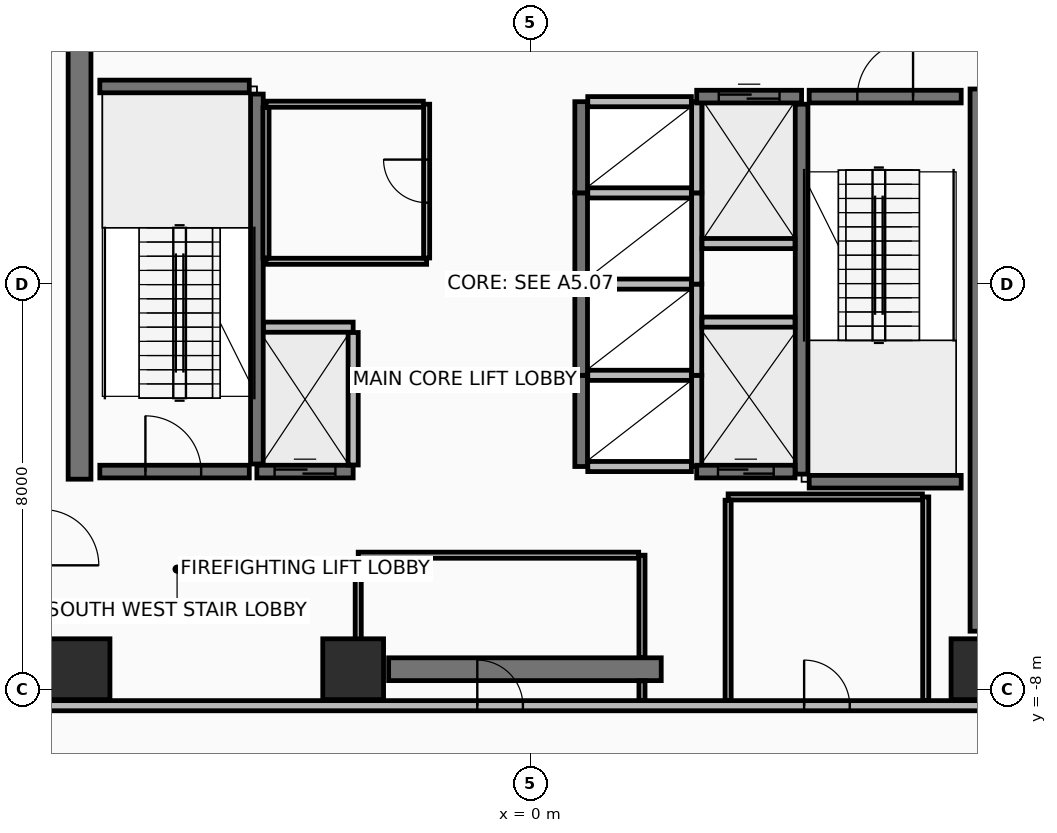
"""IFC4 building model, lengths in metres.
Left out: names, types, materials, properties, quantities, classifications, styles, units other than length and angle.
Written with IfcOpenShell. Run it as: python <this file> out.ifc"""

import sys

from ifc_helpers import new_model, si_unit, direction, frame, frame_2d, origin, origin_2d, place, context, subcontext, project, spatial, rectangle, extrude, element, fill, save


model = new_model("IFC4")
c1 = context("Model", 3, precision=1e-05, world=origin(), true_north=direction((0.0, 1.0)))
c2 = subcontext(c1, "Body", "Model", "MODEL_VIEW")
j1 = project(units=[si_unit("LENGTHUNIT", "METRE"), si_unit("PLANEANGLEUNIT", "RADIAN")], contexts=[c1])
p1 = place(None, origin())
s1 = spatial("IfcSite", under=j1, at=p1, CompositionType="ELEMENT")
p2 = place(p1, origin())
s2 = spatial("IfcBuilding", under=s1, at=p2, CompositionType="ELEMENT")
p3 = place(p2, frame((0.0, 0.0, 107.7)))
s3 = spatial("IfcBuildingStorey", under=s2, at=p3, CompositionType="ELEMENT", Elevation=107.7)
for number, where, z_axis, x_axis in (
    (1, (-8.9, -7.6, 0.0), (0.0, 0.0, 1.0), (1.0, 0.0, 0.0)),
    (2, (-3.5, -7.6, 0.0), (0.0, 0.0, 1.0), (1.0, 0.0, 0.0)),
    (3, (8.9, -7.6, 0.0), (0.0, 0.0, 1.0), (1.0, 0.0, 0.0)),
):
    element("IfcColumn", number, at=place(p3, frame(where, z_axis=z_axis, x_axis=x_axis)), inside=s3, PredefinedType="COLUMN", context=c2, shape_type="SweptSolid", body=[
        extrude(rectangle(XDim=1.2, YDim=1.2, at=origin_2d()), origin(), (0.0, 0.0, 1.0), 4.75),
    ])
p4 = place(p3, frame((-2.8, -7.6, 0.0), z_axis=(0.0, 0.0, 1.0), x_axis=(1.0, 0.0, 0.0)))
e4 = element("IfcWall", 4, at=p4, inside=s3, PredefinedType="SHEAR", context=c2, shape_type="SweptSolid", body=[
    extrude(rectangle(XDim=5.38, YDim=0.45, at=frame_2d((2.69, 0.0))), origin(), (0.0, 0.0, 1.0), 4.56),
])
for number, where, z_axis, x_axis in (
    (5, (-8.9, -3.85, 0.0), (0.0, 0.0, 1.0), (0.0, 1.0, 0.0)),
    (6, (8.9, -6.85, 0.0), (0.0, 0.0, 1.0), (0.0, 1.0, 0.0)),
):
    element("IfcWall", number, at=place(p3, frame(where, z_axis=z_axis, x_axis=x_axis)), inside=s3, PredefinedType="SHEAR", context=c2, shape_type="SweptSolid", body=[
        extrude(rectangle(XDim=10.7, YDim=0.45, at=frame_2d((5.35, 0.0))), origin(), (0.0, 0.0, 1.0), 4.56),
    ])
p5 = place(p3, frame((-9.62, -8.32, 0.0), z_axis=(0.0, 0.0, 1.0), x_axis=(1.0, 0.0, 0.0)))
e7 = element("IfcWall", 7, at=p5, inside=s3, PredefinedType="PARTITIONING", context=c2, shape_type="SweptSolid", body=[
    extrude(rectangle(XDim=19.24, YDim=0.2, at=frame_2d((9.62, 0.0))), origin(), (0.0, 0.0, 1.0), 2.355),
])
p6 = place(p5, frame((8.57, 0.0, 0.0)))
e8 = element("IfcOpeningElement", 8, at=p6, cuts=e7, PredefinedType="OPENING", context=c2, shape_type="SweptSolid", body=[
    extrude(rectangle(XDim=0.9, YDim=2.1, at=frame_2d((0.45, 1.05))), frame((0.0, 0.11, 0.0), z_axis=(0.0, -1.0, 0.0), x_axis=(1.0, 0.0, 0.0)), (0.0, 0.0, 1.0), 0.22),
])
p7 = place(p5, frame((15.02, 0.0, 0.0)))
e9 = element("IfcOpeningElement", 9, at=p7, cuts=e7, PredefinedType="OPENING", context=c2, shape_type="SweptSolid", body=[
    extrude(rectangle(XDim=0.9, YDim=2.1, at=frame_2d((0.45, 1.05))), frame((0.0, 0.11, 0.0), z_axis=(0.0, -1.0, 0.0), x_axis=(1.0, 0.0, 0.0)), (0.0, 0.0, 1.0), 0.22),
])
p8 = place(p3, frame((-5.4, -3.55, 0.0), z_axis=(0.0, 0.0, 1.0), x_axis=(0.0, 1.0, 0.0)))
e10 = element("IfcWall", 10, at=p8, inside=s3, PredefinedType="SHEAR", context=c2, shape_type="SweptSolid", body=[
    extrude(rectangle(XDim=7.3, YDim=0.25, at=frame_2d((3.65, 0.0))), origin(), (0.0, 0.0, 1.0), 4.56),
])
p9 = place(p3, frame((-8.5, -3.7, 0.0), z_axis=(0.0, 0.0, 1.0), x_axis=(1.0, 0.0, 0.0)))
e11 = element("IfcWall", 11, at=p9, inside=s3, PredefinedType="SHEAR", context=c2, shape_type="SweptSolid", body=[
    extrude(rectangle(XDim=2.95, YDim=0.25, at=frame_2d((1.475, 0.0))), origin(), (0.0, 0.0, 1.0), 4.56),
])
p10 = place(p9, frame((0.9, 0.0, 0.0)))
e12 = element("IfcOpeningElement", 12, at=p10, cuts=e11, PredefinedType="OPENING", context=c2, shape_type="SweptSolid", body=[
    extrude(rectangle(XDim=1.1, YDim=2.15, at=frame_2d((0.55, 1.075))), frame((0.0, 0.135, 0.0), z_axis=(0.0, -1.0, 0.0), x_axis=(1.0, 0.0, 0.0)), (0.0, 0.0, 1.0), 0.27),
])
p11 = place(p3, frame((-8.5, 3.9, 0.0), z_axis=(0.0, 0.0, 1.0), x_axis=(1.0, 0.0, 0.0)))
e13 = element("IfcWall", 13, at=p11, inside=s3, PredefinedType="SHEAR", context=c2, shape_type="SweptSolid", body=[
    extrude(rectangle(XDim=2.95, YDim=0.25, at=frame_2d((1.475, 0.0))), origin(), (0.0, 0.0, 1.0), 4.56),
])
p12 = place(p3, frame((5.35, -3.75, 0.0), z_axis=(0.0, 0.0, 1.0), x_axis=(0.0, 1.0, 0.0)))
e14 = element("IfcWall", 14, at=p12, inside=s3, PredefinedType="SHEAR", context=c2, shape_type="SweptSolid", body=[
    extrude(rectangle(XDim=7.3, YDim=0.25, at=frame_2d((3.65, 0.0))), origin(), (0.0, 0.0, 1.0), 4.56),
])
p13 = place(p3, frame((5.5, 3.7, 0.0), z_axis=(0.0, 0.0, 1.0), x_axis=(1.0, 0.0, 0.0)))
e15 = element("IfcWall", 15, at=p13, inside=s3, PredefinedType="SHEAR", context=c2, shape_type="SweptSolid", body=[
    extrude(rectangle(XDim=3.0, YDim=0.25, at=frame_2d((1.5, 0.0))), origin(), (0.0, 0.0, 1.0), 4.56),
])
p14 = place(p13, frame((0.95, 0.0, 0.0)))
e16 = element("IfcOpeningElement", 16, at=p14, cuts=e15, PredefinedType="OPENING", context=c2, shape_type="SweptSolid", body=[
    extrude(rectangle(XDim=1.1, YDim=2.15, at=frame_2d((0.55, 1.075))), frame((0.0, 0.135, 0.0), z_axis=(0.0, -1.0, 0.0), x_axis=(1.0, 0.0, 0.0)), (0.0, 0.0, 1.0), 0.27),
])
p15 = place(p3, frame((5.5, -3.9, 0.0), z_axis=(0.0, 0.0, 1.0), x_axis=(1.0, 0.0, 0.0)))
e17 = element("IfcWall", 17, at=p15, inside=s3, PredefinedType="SHEAR", context=c2, shape_type="SweptSolid", body=[
    extrude(rectangle(XDim=3.0, YDim=0.25, at=frame_2d((1.5, 0.0))), origin(), (0.0, 0.0, 1.0), 4.56),
])
p16 = place(p3, frame((1.0, -3.6, 0.0), z_axis=(0.0, 0.0, 1.0), x_axis=(0.0, 1.0, 0.0)))
e18 = element("IfcWall", 18, at=p16, inside=s3, PredefinedType="SHEAR", context=c2, shape_type="SweptSolid", body=[
    extrude(rectangle(XDim=1.8, YDim=0.25, at=frame_2d((0.9, 0.0))), origin(), (0.0, 0.0, 1.0), 4.56),
])
p17 = place(p3, frame((3.28, -3.6, 0.0), z_axis=(0.0, 0.0, 1.0), x_axis=(0.0, 1.0, 0.0)))
e19 = element("IfcWall", 19, at=p17, inside=s3, PredefinedType="PARTITIONING", context=c2, shape_type="SweptSolid", body=[
    extrude(rectangle(XDim=1.8, YDim=0.2, at=frame_2d((0.9, 0.0))), origin(), (0.0, 0.0, 1.0), 4.56),
])
for number, where, z_axis, x_axis in (
    (20, (1.13, -3.6, 0.0), (0.0, 0.0, 1.0), (1.0, 0.0, 0.0)),
    (21, (1.13, -1.8, 0.0), (0.0, 0.0, 1.0), (1.0, 0.0, 0.0)),
):
    element("IfcWall", number, at=place(p3, frame(where, z_axis=z_axis, x_axis=x_axis)), inside=s3, PredefinedType="PARTITIONING", context=c2, shape_type="SweptSolid", body=[
        extrude(rectangle(XDim=2.045, YDim=0.2, at=frame_2d((1.022, 0.0))), origin(), (0.0, 0.0, 1.0), 4.56),
    ])
p18 = place(p3, frame((1.0, -1.8, 0.0), z_axis=(0.0, 0.0, 1.0), x_axis=(0.0, 1.0, 0.0)))
e22 = element("IfcWall", 22, at=p18, inside=s3, PredefinedType="SHEAR", context=c2, shape_type="SweptSolid", body=[
    extrude(rectangle(XDim=1.8, YDim=0.25, at=frame_2d((0.9, 0.0))), origin(), (0.0, 0.0, 1.0), 4.56),
])
p19 = place(p3, frame((3.28, -1.8, 0.0), z_axis=(0.0, 0.0, 1.0), x_axis=(0.0, 1.0, 0.0)))
e23 = element("IfcWall", 23, at=p19, inside=s3, PredefinedType="PARTITIONING", context=c2, shape_type="SweptSolid", body=[
    extrude(rectangle(XDim=1.8, YDim=0.2, at=frame_2d((0.9, 0.0))), origin(), (0.0, 0.0, 1.0), 4.56),
])
p20 = place(p3, frame((1.13, 0.0, 0.0), z_axis=(0.0, 0.0, 1.0), x_axis=(1.0, 0.0, 0.0)))
e24 = element("IfcWall", 24, at=p20, inside=s3, PredefinedType="PARTITIONING", context=c2, shape_type="SweptSolid", body=[
    extrude(rectangle(XDim=2.045, YDim=0.2, at=frame_2d((1.022, 0.0))), origin(), (0.0, 0.0, 1.0), 4.56),
])
p21 = place(p3, frame((1.0, 0.0, 0.0), z_axis=(0.0, 0.0, 1.0), x_axis=(0.0, 1.0, 0.0)))
e25 = element("IfcWall", 25, at=p21, inside=s3, PredefinedType="SHEAR", context=c2, shape_type="SweptSolid", body=[
    extrude(rectangle(XDim=1.8, YDim=0.25, at=frame_2d((0.9, 0.0))), origin(), (0.0, 0.0, 1.0), 4.56),
])
p22 = place(p3, frame((3.28, 0.0, 0.0), z_axis=(0.0, 0.0, 1.0), x_axis=(0.0, 1.0, 0.0)))
e26 = element("IfcWall", 26, at=p22, inside=s3, PredefinedType="PARTITIONING", context=c2, shape_type="SweptSolid", body=[
    extrude(rectangle(XDim=1.8, YDim=0.2, at=frame_2d((0.9, 0.0))), origin(), (0.0, 0.0, 1.0), 4.56),
])
p23 = place(p3, frame((1.13, 1.8, 0.0), z_axis=(0.0, 0.0, 1.0), x_axis=(1.0, 0.0, 0.0)))
e27 = element("IfcWall", 27, at=p23, inside=s3, PredefinedType="PARTITIONING", context=c2, shape_type="SweptSolid", body=[
    extrude(rectangle(XDim=2.045, YDim=0.2, at=frame_2d((1.022, 0.0))), origin(), (0.0, 0.0, 1.0), 4.56),
])
p24 = place(p3, frame((1.0, 1.8, 0.0), z_axis=(0.0, 0.0, 1.0), x_axis=(0.0, 1.0, 0.0)))
e28 = element("IfcWall", 28, at=p24, inside=s3, PredefinedType="SHEAR", context=c2, shape_type="SweptSolid", body=[
    extrude(rectangle(XDim=1.8, YDim=0.25, at=frame_2d((0.9, 0.0))), origin(), (0.0, 0.0, 1.0), 4.56),
])
p25 = place(p3, frame((3.28, 1.8, 0.0), z_axis=(0.0, 0.0, 1.0), x_axis=(0.0, 1.0, 0.0)))
e29 = element("IfcWall", 29, at=p25, inside=s3, PredefinedType="PARTITIONING", context=c2, shape_type="SweptSolid", body=[
    extrude(rectangle(XDim=1.8, YDim=0.2, at=frame_2d((0.9, 0.0))), origin(), (0.0, 0.0, 1.0), 4.56),
])
p26 = place(p3, frame((1.13, 3.6, 0.0), z_axis=(0.0, 0.0, 1.0), x_axis=(1.0, 0.0, 0.0)))
e30 = element("IfcWall", 30, at=p26, inside=s3, PredefinedType="PARTITIONING", context=c2, shape_type="SweptSolid", body=[
    extrude(rectangle(XDim=2.045, YDim=0.2, at=frame_2d((1.022, 0.0))), origin(), (0.0, 0.0, 1.0), 3.755),
])
p27 = place(p3, frame((-5.4, -3.7, 0.0), z_axis=(0.0, 0.0, 1.0), x_axis=(1.0, 0.0, 0.0)))
e31 = element("IfcWall", 31, at=p27, inside=s3, PredefinedType="SHEAR", context=c2, shape_type="SweptSolid", body=[
    extrude(rectangle(XDim=1.9, YDim=0.25, at=frame_2d((0.95, 0.0))), origin(), (0.0, 0.0, 1.0), 4.56),
])
p28 = place(p27, frame((0.35, 0.0, 0.0)))
e32 = element("IfcOpeningElement", 32, at=p28, cuts=e31, PredefinedType="OPENING", context=c2, shape_type="SweptSolid", body=[
    extrude(rectangle(XDim=1.2, YDim=2.2, at=frame_2d((0.6, 1.1))), frame((0.0, 0.135, 0.0), z_axis=(0.0, -1.0, 0.0), x_axis=(1.0, 0.0, 0.0)), (0.0, 0.0, 1.0), 0.27),
])
p29 = place(p3, frame((-5.27, -0.85, 0.0), z_axis=(0.0, 0.0, 1.0), x_axis=(1.0, 0.0, 0.0)))
e33 = element("IfcWall", 33, at=p29, inside=s3, PredefinedType="PARTITIONING", context=c2, shape_type="SweptSolid", body=[
    extrude(rectangle(XDim=1.77, YDim=0.2, at=frame_2d((0.885, 0.0))), origin(), (0.0, 0.0, 1.0), 4.56),
])
p30 = place(p3, frame((-3.5, -3.57, 0.0), z_axis=(0.0, 0.0, 1.0), x_axis=(0.0, 1.0, 0.0)))
e34 = element("IfcWall", 34, at=p30, inside=s3, PredefinedType="PARTITIONING", context=c2, shape_type="SweptSolid", body=[
    extrude(rectangle(XDim=2.615, YDim=0.2, at=frame_2d((1.308, 0.0))), origin(), (0.0, 0.0, 1.0), 4.56),
])
p31 = place(p3, frame((3.28, 3.7, 0.0), z_axis=(0.0, 0.0, 1.0), x_axis=(1.0, 0.0, 0.0)))
e35 = element("IfcWall", 35, at=p31, inside=s3, PredefinedType="SHEAR", context=c2, shape_type="SweptSolid", body=[
    extrude(rectangle(XDim=2.07, YDim=0.25, at=frame_2d((1.035, 0.0))), origin(), (0.0, 0.0, 1.0), 4.56),
])
p32 = place(p31, frame((0.435, 0.0, 0.0)))
e36 = element("IfcOpeningElement", 36, at=p32, cuts=e35, PredefinedType="OPENING", context=c2, shape_type="SweptSolid", body=[
    extrude(rectangle(XDim=1.2, YDim=2.2, at=frame_2d((0.6, 1.1))), frame((0.0, 0.135, 0.0), z_axis=(0.0, -1.0, 0.0), x_axis=(1.0, 0.0, 0.0)), (0.0, 0.0, 1.0), 0.27),
])
p33 = place(p3, frame((3.385, 0.8, 0.0), z_axis=(0.0, 0.0, 1.0), x_axis=(1.0, 0.0, 0.0)))
e37 = element("IfcWall", 37, at=p33, inside=s3, PredefinedType="PARTITIONING", context=c2, shape_type="SweptSolid", body=[
    extrude(rectangle(XDim=1.835, YDim=0.2, at=frame_2d((0.917, 0.0))), origin(), (0.0, 0.0, 1.0), 4.56),
])
p34 = place(p3, frame((3.28, -3.7, 0.0), z_axis=(0.0, 0.0, 1.0), x_axis=(1.0, 0.0, 0.0)))
e38 = element("IfcWall", 38, at=p34, inside=s3, PredefinedType="SHEAR", context=c2, shape_type="SweptSolid", body=[
    extrude(rectangle(XDim=1.94, YDim=0.25, at=frame_2d((0.97, 0.0))), origin(), (0.0, 0.0, 1.0), 4.56),
])
p35 = place(p34, frame((0.42, 0.0, 0.0)))
e39 = element("IfcOpeningElement", 39, at=p35, cuts=e38, PredefinedType="OPENING", context=c2, shape_type="SweptSolid", body=[
    extrude(rectangle(XDim=1.1, YDim=2.2, at=frame_2d((0.55, 1.1))), frame((0.0, 0.135, 0.0), z_axis=(0.0, -1.0, 0.0), x_axis=(1.0, 0.0, 0.0)), (0.0, 0.0, 1.0), 0.27),
])
p36 = place(p3, frame((3.385, -0.75, 0.0), z_axis=(0.0, 0.0, 1.0), x_axis=(1.0, 0.0, 0.0)))
e40 = element("IfcWall", 40, at=p36, inside=s3, PredefinedType="PARTITIONING", context=c2, shape_type="SweptSolid", body=[
    extrude(rectangle(XDim=1.835, YDim=0.2, at=frame_2d((0.917, 0.0))), origin(), (0.0, 0.0, 1.0), 4.56),
])
p37 = place(p3, frame((-5.22, 0.45, 0.0), z_axis=(0.0, 0.0, 1.0), x_axis=(1.0, 0.0, 0.0)))
e41 = element("IfcWall", 41, at=p37, inside=s3, PredefinedType="PARTITIONING", context=c2, shape_type="SweptSolid", body=[
    extrude(rectangle(XDim=3.17, YDim=0.12, at=frame_2d((1.585, 0.0))), origin(), (0.0, 0.0, 1.0), 4.56),
])
p38 = place(p3, frame((-2.05, 0.515, 0.0), z_axis=(0.0, 0.0, 1.0), x_axis=(0.0, 1.0, 0.0)))
e42 = element("IfcWall", 42, at=p38, inside=s3, PredefinedType="PARTITIONING", context=c2, shape_type="SweptSolid", body=[
    extrude(rectangle(XDim=3.035, YDim=0.12, at=frame_2d((1.518, 0.0))), origin(), (0.0, 0.0, 1.0), 4.56),
])
p39 = place(p38, frame((1.092, 0.0, 0.0)))
e43 = element("IfcOpeningElement", 43, at=p39, cuts=e42, PredefinedType="OPENING", context=c2, shape_type="SweptSolid", body=[
    extrude(rectangle(XDim=0.85, YDim=2.1, at=frame_2d((0.425, 1.05))), frame((0.0, 0.07, 0.0), z_axis=(0.0, -1.0, 0.0), x_axis=(1.0, 0.0, 0.0)), (0.0, 0.0, 1.0), 0.14),
])
p40 = place(p3, frame((-2.115, 3.55, 0.0), z_axis=(0.0, 0.0, 1.0), x_axis=(-1.0, 0.0, 0.0)))
e44 = element("IfcWall", 44, at=p40, inside=s3, PredefinedType="PARTITIONING", context=c2, shape_type="SweptSolid", body=[
    extrude(rectangle(XDim=3.105, YDim=0.12, at=frame_2d((1.552, 0.0))), origin(), (0.0, 0.0, 1.0), 4.56),
])
p41 = place(p3, frame((-5.22, 3.485, 0.0), z_axis=(0.0, 0.0, 1.0), x_axis=(0.0, -1.0, 0.0)))
e45 = element("IfcWall", 45, at=p41, inside=s3, PredefinedType="PARTITIONING", context=c2, shape_type="SweptSolid", body=[
    extrude(rectangle(XDim=2.97, YDim=0.12, at=frame_2d((1.485, 0.0))), origin(), (0.0, 0.0, 1.0), 4.56),
])
p42 = place(p3, frame((2.2, -8.215, 0.0), z_axis=(0.0, 0.0, 1.0), x_axis=(0.0, 1.0, 0.0)))
e46 = element("IfcWall", 46, at=p42, inside=s3, PredefinedType="PARTITIONING", context=c2, shape_type="SweptSolid", body=[
    extrude(rectangle(XDim=0.385, YDim=0.12, at=frame_2d((0.192, 0.0))), origin(), (0.0, 0.0, 1.0), 3.755),
])
p43 = place(p3, frame((2.2, -7.37, 0.0), z_axis=(0.0, 0.0, 1.0), x_axis=(0.0, 1.0, 0.0)))
e47 = element("IfcWall", 47, at=p43, inside=s3, PredefinedType="PARTITIONING", context=c2, shape_type="SweptSolid", body=[
    extrude(rectangle(XDim=2.02, YDim=0.12, at=frame_2d((1.01, 0.0))), origin(), (0.0, 0.0, 1.0), 3.755),
])
p44 = place(p3, frame((2.135, -5.35, 0.0), z_axis=(0.0, 0.0, 1.0), x_axis=(-1.0, 0.0, 0.0)))
e48 = element("IfcWall", 48, at=p44, inside=s3, PredefinedType="PARTITIONING", context=c2, shape_type="SweptSolid", body=[
    extrude(rectangle(XDim=5.535, YDim=0.12, at=frame_2d((2.768, 0.0))), origin(), (0.0, 0.0, 1.0), 3.755),
])
p45 = place(p3, frame((-3.4, -5.415, 0.0), z_axis=(0.0, 0.0, 1.0), x_axis=(0.0, -1.0, 0.0)))
e49 = element("IfcWall", 49, at=p45, inside=s3, PredefinedType="PARTITIONING", context=c2, shape_type="SweptSolid", body=[
    extrude(rectangle(XDim=2.8, YDim=0.12, at=frame_2d((1.4, 0.0))), origin(), (0.0, 0.0, 1.0), 2.355),
])
p46 = place(p3, frame((7.8, -8.215, 0.0), z_axis=(0.0, 0.0, 1.0), x_axis=(0.0, 1.0, 0.0)))
e50 = element("IfcWall", 50, at=p46, inside=s3, PredefinedType="PARTITIONING", context=c2, shape_type="SweptSolid", body=[
    extrude(rectangle(XDim=4.015, YDim=0.12, at=frame_2d((2.008, 0.0))), origin(), (0.0, 0.0, 1.0), 3.755),
])
p47 = place(p3, frame((7.735, -4.2, 0.0), z_axis=(0.0, 0.0, 1.0), x_axis=(-1.0, 0.0, 0.0)))
e51 = element("IfcWall", 51, at=p47, inside=s3, PredefinedType="PARTITIONING", context=c2, shape_type="SweptSolid", body=[
    extrude(rectangle(XDim=3.835, YDim=0.12, at=frame_2d((1.917, 0.0))), origin(), (0.0, 0.0, 1.0), 4.56),
])
p48 = place(p3, frame((3.9, -4.265, 0.0), z_axis=(0.0, 0.0, 1.0), x_axis=(0.0, -1.0, 0.0)))
e52 = element("IfcWall", 52, at=p48, inside=s3, PredefinedType="PARTITIONING", context=c2, shape_type="SweptSolid", body=[
    extrude(rectangle(XDim=3.95, YDim=0.12, at=frame_2d((1.975, 0.0))), origin(), (0.0, 0.0, 1.0), 3.755),
])
p49 = place(p10, origin())
e53 = element("IfcDoor", 53, at=p49, inside=s3, OperationType="SINGLE_SWING_LEFT", PredefinedType="DOOR", context=c2, shape_type="SweptSolid", body=[
    extrude(rectangle(XDim=1.1, YDim=2.15, at=frame_2d((0.55, 1.075))), frame((0.0, 0.025, 0.0), z_axis=(0.0, -1.0, 0.0), x_axis=(1.0, 0.0, 0.0)), (0.0, 0.0, 1.0), 0.05),
])
fill(e12, e53)
p50 = place(p14, frame((1.1, 0.0, 0.0), z_axis=(0.0, 0.0, 1.0), x_axis=(-1.0, 0.0, 0.0)))
e54 = element("IfcDoor", 54, at=p50, inside=s3, OperationType="SINGLE_SWING_LEFT", PredefinedType="DOOR", context=c2, shape_type="SweptSolid", body=[
    extrude(rectangle(XDim=1.1, YDim=2.15, at=frame_2d((0.55, 1.075))), frame((0.0, 0.025, 0.0), z_axis=(0.0, -1.0, 0.0), x_axis=(1.0, 0.0, 0.0)), (0.0, 0.0, 1.0), 0.05),
])
fill(e16, e54)
p51 = place(p28, origin())
e55 = element("IfcDoor", 55, at=p51, inside=s3, OperationType="SLIDING_TO_RIGHT", PredefinedType="DOOR", context=c2, shape_type="SweptSolid", body=[
    extrude(rectangle(XDim=1.2, YDim=2.2, at=frame_2d((0.6, 1.1))), frame((0.0, 0.025, 0.0), z_axis=(0.0, -1.0, 0.0), x_axis=(1.0, 0.0, 0.0)), (0.0, 0.0, 1.0), 0.05),
])
fill(e32, e55)
p52 = place(p32, origin())
e56 = element("IfcDoor", 56, at=p52, inside=s3, OperationType="SLIDING_TO_RIGHT", PredefinedType="DOOR", context=c2, shape_type="SweptSolid", body=[
    extrude(rectangle(XDim=1.2, YDim=2.2, at=frame_2d((0.6, 1.1))), frame((0.0, 0.025, 0.0), z_axis=(0.0, -1.0, 0.0), x_axis=(1.0, 0.0, 0.0)), (0.0, 0.0, 1.0), 0.05),
])
fill(e36, e56)
p53 = place(p35, origin())
e57 = element("IfcDoor", 57, at=p53, inside=s3, OperationType="SLIDING_TO_LEFT", PredefinedType="DOOR", context=c2, shape_type="SweptSolid", body=[
    extrude(rectangle(XDim=1.1, YDim=2.2, at=frame_2d((0.55, 1.1))), frame((0.0, 0.025, 0.0), z_axis=(0.0, -1.0, 0.0), x_axis=(1.0, 0.0, 0.0)), (0.0, 0.0, 1.0), 0.05),
])
fill(e39, e57)
p54 = place(p39, frame((0.85, 0.0, 0.0), z_axis=(0.0, 0.0, 1.0), x_axis=(-1.0, 0.0, 0.0)))
e58 = element("IfcDoor", 58, at=p54, inside=s3, OperationType="SINGLE_SWING_RIGHT", PredefinedType="DOOR", context=c2, shape_type="SweptSolid", body=[
    extrude(rectangle(XDim=0.85, YDim=2.1, at=frame_2d((0.425, 1.05))), frame((0.0, 0.025, 0.0), z_axis=(0.0, -1.0, 0.0), x_axis=(1.0, 0.0, 0.0)), (0.0, 0.0, 1.0), 0.05),
])
fill(e43, e58)
p55 = place(p6, origin())
e59 = element("IfcDoor", 59, at=p55, inside=s3, OperationType="SINGLE_SWING_LEFT", PredefinedType="DOOR", context=c2, shape_type="SweptSolid", body=[
    extrude(rectangle(XDim=0.9, YDim=2.1, at=frame_2d((0.45, 1.05))), frame((0.0, 0.025, 0.0), z_axis=(0.0, -1.0, 0.0), x_axis=(1.0, 0.0, 0.0)), (0.0, 0.0, 1.0), 0.05),
])
fill(e8, e59)
p56 = place(p7, origin())
e60 = element("IfcDoor", 60, at=p56, inside=s3, OperationType="SINGLE_SWING_LEFT", PredefinedType="DOOR", context=c2, shape_type="SweptSolid", body=[
    extrude(rectangle(XDim=0.9, YDim=2.1, at=frame_2d((0.45, 1.05))), frame((0.0, 0.025, 0.0), z_axis=(0.0, -1.0, 0.0), x_axis=(1.0, 0.0, 0.0)), (0.0, 0.0, 1.0), 0.05),
])
fill(e9, e60)
save(model, sys.argv[1])
